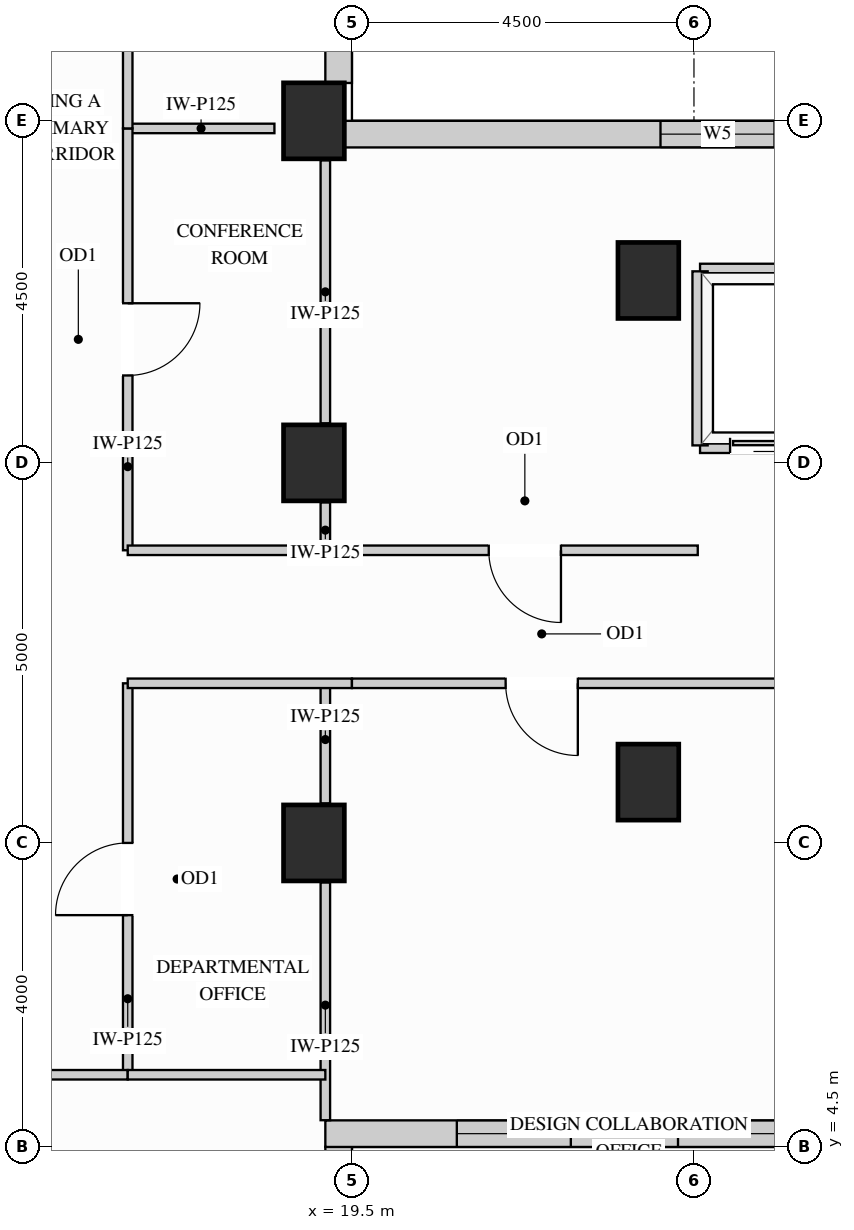
"""IFC4 building model, lengths in metres.
Left out: names, types, materials, properties, quantities, classifications, styles, units other than length and angle.
Written with IfcOpenShell. Run it as: python <this file> out.ifc"""

import sys

from ifc_helpers import new_model, si_unit, direction, frame, frame_2d, origin, origin_2d, place, context, subcontext, project, spatial, rectangle, extrude, source, transform, mapped, element, fill, save


model = new_model("IFC4")
c1 = context("Model", 3, precision=1e-05, world=origin(), true_north=direction((0.0, 1.0)))
c2 = subcontext(c1, "Body", "Model", "MODEL_VIEW")
j1 = project(units=[si_unit("LENGTHUNIT", "METRE"), si_unit("PLANEANGLEUNIT", "RADIAN")], contexts=[c1])
p1 = place(None, origin())
s1 = spatial("IfcSite", under=j1, at=p1, CompositionType="ELEMENT")
p2 = place(p1, origin())
s2 = spatial("IfcBuilding", under=s1, at=p2, CompositionType="ELEMENT")
p3 = place(p2, frame((0.0, 0.0, 146.7)))
s3 = spatial("IfcBuildingStorey", under=s2, at=p3, CompositionType="ELEMENT", Elevation=146.7)
m1 = source(origin(), c2, "Body", "SweptSolid", [
    extrude(rectangle(XDim=0.8, YDim=1.0, at=origin_2d()), origin(), (0.0, 0.0, 1.0), 3.4),
])
for number, where, z_axis, x_axis in (
    (1, (19.0, 13.5, 0.0), (0.0, 0.0, 1.0), (1.0, 0.0, 0.0)),
    (2, (19.0, 18.0, 0.0), (0.0, 0.0, 1.0), (1.0, 0.0, 0.0)),
    (3, (19.0, 8.5, 0.0), (0.0, 0.0, 1.0), (1.0, 0.0, 0.0)),
    (4, (23.4, 15.9, 0.0), (0.0, 0.0, 1.0), (1.0, 0.0, 0.0)),
    (5, (23.4, 9.3, 0.0), (0.0, 0.0, 1.0), (1.0, 0.0, 0.0)),
):
    element("IfcColumn", number, at=place(p3, frame(where, z_axis=z_axis, x_axis=x_axis)), inside=s3, PredefinedType="COLUMN", context=c2, shape_type="MappedRepresentation", body=[
        mapped(m1, transform((0.0, 0.0, 0.0), x_axis=(1.0, 0.0, 0.0), y_axis=(0.0, 1.0, 0.0), z_axis=(0.0, 0.0, 1.0))),
    ])
m2 = source(origin(), c2, "Body", "SweptSolid", [
    extrude(rectangle(XDim=0.504, YDim=0.35, at=frame_2d((0.252, 0.0))), origin(), (0.0, 0.0, 1.0), 2.773),
])
p4 = place(p3, frame((19.325, 3.998, 0.0), z_axis=(0.0, 0.0, 1.0), x_axis=(0.0, 1.0, 0.0)))
e6 = element("IfcWall", 6, at=p4, inside=s3, PredefinedType="SOLIDWALL", context=c2, shape_type="MappedRepresentation", body=[
    mapped(m2, transform((0.0, 0.0, 0.0), x_axis=(1.0, 0.0, 0.0), y_axis=(0.0, 1.0, 0.0), z_axis=(0.0, 0.0, 1.0))),
])
p5 = place(p3, frame((19.15, 4.675, 0.0), z_axis=(0.0, 0.0, 1.0), x_axis=(1.0, 0.0, 0.0)))
e7 = element("IfcWall", 7, at=p5, inside=s3, PredefinedType="SOLIDWALL", context=c2, shape_type="SweptSolid", body=[
    extrude(rectangle(XDim=14.98, YDim=0.35, at=frame_2d((7.49, 0.0))), origin(), (0.0, 0.0, 1.0), 3.385),
])
p6 = place(p5, frame((1.73, 0.0, 0.78)))
e8 = element("IfcOpeningElement", 8, at=p6, cuts=e7, PredefinedType="OPENING", context=c2, shape_type="SweptSolid", body=[
    extrude(rectangle(XDim=1.5, YDim=2.0, at=frame_2d((0.75, 1.0))), frame((0.0, 0.185, 0.0), z_axis=(0.0, -1.0, 0.0), x_axis=(1.0, 0.0, 0.0)), (0.0, 0.0, 1.0), 0.37),
])
p7 = place(p5, frame((4.64, 0.0, 0.78)))
e9 = element("IfcOpeningElement", 9, at=p7, cuts=e7, PredefinedType="OPENING", context=c2, shape_type="SweptSolid", body=[
    extrude(rectangle(XDim=1.5, YDim=2.0, at=frame_2d((0.75, 1.0))), frame((0.0, 0.185, 0.0), z_axis=(0.0, -1.0, 0.0), x_axis=(1.0, 0.0, 0.0)), (0.0, 0.0, 1.0), 0.37),
])
p8 = place(p5, frame((9.253, 0.0, 0.78)))
e10 = element("IfcOpeningElement", 10, at=p8, cuts=e7, PredefinedType="OPENING", context=c2, shape_type="SweptSolid", body=[
    extrude(rectangle(XDim=1.5, YDim=2.0, at=frame_2d((0.75, 1.0))), frame((0.0, 0.185, 0.0), z_axis=(0.0, -1.0, 0.0), x_axis=(1.0, 0.0, 0.0)), (0.0, 0.0, 1.0), 0.37),
])
p9 = place(p5, frame((11.957, 0.0, 0.78)))
e11 = element("IfcOpeningElement", 11, at=p9, cuts=e7, PredefinedType="OPENING", context=c2, shape_type="SweptSolid", body=[
    extrude(rectangle(XDim=1.5, YDim=2.0, at=frame_2d((0.75, 1.0))), frame((0.0, 0.185, 0.0), z_axis=(0.0, -1.0, 0.0), x_axis=(1.0, 0.0, 0.0)), (0.0, 0.0, 1.0), 0.37),
])
p10 = place(p3, frame((34.502, 17.825, 0.0), z_axis=(0.0, 0.0, 1.0), x_axis=(-1.0, 0.0, 0.0)))
e12 = element("IfcWall", 12, at=p10, inside=s3, PredefinedType="SOLIDWALL", context=c2, shape_type="SweptSolid", body=[
    extrude(rectangle(XDim=15.104, YDim=0.35, at=frame_2d((7.552, 0.0))), origin(), (0.0, 0.0, 1.0), 3.385),
])
p11 = place(p10, frame((4.131, 0.0, 0.78)))
e13 = element("IfcOpeningElement", 13, at=p11, cuts=e12, PredefinedType="OPENING", context=c2, shape_type="SweptSolid", body=[
    extrude(rectangle(XDim=1.5, YDim=2.0, at=frame_2d((0.75, 1.0))), frame((0.0, 0.185, 0.0), z_axis=(0.0, -1.0, 0.0), x_axis=(1.0, 0.0, 0.0)), (0.0, 0.0, 1.0), 0.37),
])
p12 = place(p10, frame((9.442, 0.0, 0.78)))
e14 = element("IfcOpeningElement", 14, at=p12, cuts=e12, PredefinedType="OPENING", context=c2, shape_type="SweptSolid", body=[
    extrude(rectangle(XDim=1.5, YDim=2.0, at=frame_2d((0.75, 1.0))), frame((0.0, 0.185, 0.0), z_axis=(0.0, -1.0, 0.0), x_axis=(1.0, 0.0, 0.0)), (0.0, 0.0, 1.0), 0.37),
])
p13 = place(p3, frame((19.325, 18.498, 0.0), z_axis=(0.0, 0.0, 1.0), x_axis=(0.0, 1.0, 0.0)))
e15 = element("IfcWall", 15, at=p13, inside=s3, PredefinedType="SOLIDWALL", context=c2, shape_type="SweptSolid", body=[
    extrude(rectangle(XDim=3.504, YDim=0.35, at=frame_2d((1.752, 0.0))), origin(), (0.0, 0.0, 1.0), 2.612),
])
p14 = place(p13, frame((0.433, 0.0, 0.78)))
e16 = element("IfcOpeningElement", 16, at=p14, cuts=e15, PredefinedType="OPENING", context=c2, shape_type="SweptSolid", body=[
    extrude(rectangle(XDim=1.2, YDim=1.652, at=frame_2d((0.6, 0.826))), frame((0.0, 0.185, 0.0), z_axis=(0.0, -1.0, 0.0), x_axis=(1.0, 0.0, 0.0)), (0.0, 0.0, 1.0), 0.37),
])
m3 = source(origin(), c2, "Body", "SweptSolid", [
    extrude(rectangle(XDim=1.93, YDim=0.125, at=frame_2d((0.965, 0.0))), origin(), (0.0, 0.0, 1.0), 2.773),
])
p15 = place(p3, frame((16.55, 17.9, 0.0), z_axis=(0.0, 0.0, 1.0), x_axis=(1.0, 0.0, 0.0)))
e17 = element("IfcWall", 17, at=p15, inside=s3, PredefinedType="PARTITIONING", context=c2, shape_type="MappedRepresentation", body=[
    mapped(m3, transform((0.0, 0.0, 0.0), x_axis=(1.0, 0.0, 0.0), y_axis=(0.0, 1.0, 0.0), z_axis=(0.0, 0.0, 1.0))),
])
m4 = source(origin(), c2, "Body", "SweptSolid", [
    extrude(rectangle(XDim=0.63, YDim=0.125, at=frame_2d((0.315, 0.0))), origin(), (0.0, 0.0, 1.0), 2.773),
])
p16 = place(p3, frame((19.15, 12.35, 0.0), z_axis=(0.0, 0.0, 1.0), x_axis=(0.0, 1.0, 0.0)))
e18 = element("IfcWall", 18, at=p16, inside=s3, PredefinedType="PARTITIONING", context=c2, shape_type="MappedRepresentation", body=[
    mapped(m4, transform((0.0, 0.0, 0.0), x_axis=(1.0, 0.0, 0.0), y_axis=(0.0, 1.0, 0.0), z_axis=(0.0, 0.0, 1.0))),
])
m5 = source(origin(), c2, "Body", "SweptSolid", [
    extrude(rectangle(XDim=3.46, YDim=0.125, at=frame_2d((1.73, 0.0))), origin(), (0.0, 0.0, 1.0), 2.773),
])
p17 = place(p3, frame((19.15, 14.02, 0.0), z_axis=(0.0, 0.0, 1.0), x_axis=(0.0, 1.0, 0.0)))
e19 = element("IfcWall", 19, at=p17, inside=s3, PredefinedType="PARTITIONING", context=c2, shape_type="MappedRepresentation", body=[
    mapped(m5, transform((0.0, 0.0, 0.0), x_axis=(1.0, 0.0, 0.0), y_axis=(0.0, 1.0, 0.0), z_axis=(0.0, 0.0, 1.0))),
])
m6 = source(origin(), c2, "Body", "SweptSolid", [
    extrude(rectangle(XDim=3.128, YDim=0.125, at=frame_2d((1.564, 0.0))), origin(), (0.0, 0.0, 1.0), 2.773),
])
p18 = place(p3, frame((19.15, 4.852, 0.0), z_axis=(0.0, 0.0, 1.0), x_axis=(0.0, 1.0, 0.0)))
e20 = element("IfcWall", 20, at=p18, inside=s3, PredefinedType="PARTITIONING", context=c2, shape_type="MappedRepresentation", body=[
    mapped(m6, transform((0.0, 0.0, 0.0), x_axis=(1.0, 0.0, 0.0), y_axis=(0.0, 1.0, 0.0), z_axis=(0.0, 0.0, 1.0))),
])
m7 = source(origin(), c2, "Body", "SweptSolid", [
    extrude(rectangle(XDim=1.58, YDim=0.125, at=frame_2d((0.79, 0.0))), origin(), (0.0, 0.0, 1.0), 2.773),
])
p19 = place(p3, frame((19.15, 9.02, 0.0), z_axis=(0.0, 0.0, 1.0), x_axis=(0.0, 1.0, 0.0)))
e21 = element("IfcWall", 21, at=p19, inside=s3, PredefinedType="PARTITIONING", context=c2, shape_type="MappedRepresentation", body=[
    mapped(m7, transform((0.0, 0.0, 0.0), x_axis=(1.0, 0.0, 0.0), y_axis=(0.0, 1.0, 0.0), z_axis=(0.0, 0.0, 1.0))),
])
p20 = place(p3, frame((16.55, 12.35, 0.0), z_axis=(0.0, 0.0, 1.0), x_axis=(0.0, 1.0, 0.0)))
e22 = element("IfcWall", 22, at=p20, inside=s3, PredefinedType="PARTITIONING", context=c2, shape_type="SweptSolid", body=[
    extrude(rectangle(XDim=5.55, YDim=0.125, at=frame_2d((2.775, 0.0))), origin(), (0.0, 0.0, 1.0), 3.385),
])
p21 = place(p20, frame((2.3, 0.0, 0.0)))
e23 = element("IfcOpeningElement", 23, at=p21, cuts=e22, PredefinedType="OPENING", context=c2, shape_type="SweptSolid", body=[
    extrude(rectangle(XDim=0.95, YDim=2.15, at=frame_2d((0.475, 1.075))), frame((0.0, 0.073, 0.0), z_axis=(0.0, -1.0, 0.0), x_axis=(1.0, 0.0, 0.0)), (0.0, 0.0, 1.0), 0.145),
])
p22 = place(p3, frame((16.55, 17.9, 0.0), z_axis=(0.0, 0.0, 1.0), x_axis=(0.0, 1.0, 0.0)))
e24 = element("IfcWall", 24, at=p22, inside=s3, PredefinedType="PARTITIONING", context=c2, shape_type="SweptSolid", body=[
    extrude(rectangle(XDim=5.45, YDim=0.125, at=frame_2d((2.725, 0.0))), origin(), (0.0, 0.0, 1.0), 3.385),
])
p23 = place(p22, frame((2.25, 0.0, 0.0)))
e25 = element("IfcOpeningElement", 25, at=p23, cuts=e24, PredefinedType="OPENING", context=c2, shape_type="SweptSolid", body=[
    extrude(rectangle(XDim=0.95, YDim=2.15, at=frame_2d((0.475, 1.075))), frame((0.0, 0.073, 0.0), z_axis=(0.0, -1.0, 0.0), x_axis=(1.0, 0.0, 0.0)), (0.0, 0.0, 1.0), 0.145),
])
p24 = place(p3, frame((16.55, 5.45, 0.0), z_axis=(0.0, 0.0, 1.0), x_axis=(0.0, 1.0, 0.0)))
e26 = element("IfcWall", 26, at=p24, inside=s3, PredefinedType="PARTITIONING", context=c2, shape_type="SweptSolid", body=[
    extrude(rectangle(XDim=5.15, YDim=0.125, at=frame_2d((2.575, 0.0))), origin(), (0.0, 0.0, 1.0), 3.385),
])
p25 = place(p24, frame((2.1, 0.0, 0.0)))
e27 = element("IfcOpeningElement", 27, at=p25, cuts=e26, PredefinedType="OPENING", context=c2, shape_type="SweptSolid", body=[
    extrude(rectangle(XDim=0.95, YDim=2.15, at=frame_2d((0.475, 1.075))), frame((0.0, 0.073, 0.0), z_axis=(0.0, -1.0, 0.0), x_axis=(1.0, 0.0, 0.0)), (0.0, 0.0, 1.0), 0.145),
])
m8 = source(origin(), c2, "Body", "SweptSolid", [
    extrude(rectangle(XDim=2.95, YDim=0.125, at=frame_2d((1.475, 0.0))), origin(), (0.0, 0.0, 1.0), 3.385),
])
p26 = place(p3, frame((16.55, 12.35, 0.0), z_axis=(0.0, 0.0, 1.0), x_axis=(1.0, 0.0, 0.0)))
e28 = element("IfcWall", 28, at=p26, inside=s3, PredefinedType="PARTITIONING", context=c2, shape_type="MappedRepresentation", body=[
    mapped(m8, transform((0.0, 0.0, 0.0), x_axis=(1.0, 0.0, 0.0), y_axis=(0.0, 1.0, 0.0), z_axis=(0.0, 0.0, 1.0))),
])
p27 = place(p3, frame((19.5, 12.35, 0.0), z_axis=(0.0, 0.0, 1.0), x_axis=(1.0, 0.0, 0.0)))
e29 = element("IfcWall", 29, at=p27, inside=s3, PredefinedType="PARTITIONING", context=c2, shape_type="SweptSolid", body=[
    extrude(rectangle(XDim=4.55, YDim=0.125, at=frame_2d((2.275, 0.0))), origin(), (0.0, 0.0, 1.0), 3.385),
])
p28 = place(p27, frame((1.8, 0.0, 0.0)))
e30 = element("IfcOpeningElement", 30, at=p28, cuts=e29, PredefinedType="OPENING", context=c2, shape_type="SweptSolid", body=[
    extrude(rectangle(XDim=0.95, YDim=2.15, at=frame_2d((0.475, 1.075))), frame((0.0, 0.073, 0.0), z_axis=(0.0, -1.0, 0.0), x_axis=(1.0, 0.0, 0.0)), (0.0, 0.0, 1.0), 0.145),
])
p29 = place(p3, frame((16.55, 10.6, 0.0), z_axis=(0.0, 0.0, 1.0), x_axis=(1.0, 0.0, 0.0)))
e31 = element("IfcWall", 31, at=p29, inside=s3, PredefinedType="PARTITIONING", context=c2, shape_type="MappedRepresentation", body=[
    mapped(m8, transform((0.0, 0.0, 0.0), x_axis=(1.0, 0.0, 0.0), y_axis=(0.0, 1.0, 0.0), z_axis=(0.0, 0.0, 1.0))),
])
p30 = place(p3, frame((19.5, 10.6, 0.0), z_axis=(0.0, 0.0, 1.0), x_axis=(1.0, 0.0, 0.0)))
e32 = element("IfcWall", 32, at=p30, inside=s3, PredefinedType="PARTITIONING", context=c2, shape_type="SweptSolid", body=[
    extrude(rectangle(XDim=7.45, YDim=0.125, at=frame_2d((3.725, 0.0))), origin(), (0.0, 0.0, 1.0), 3.385),
])
p31 = place(p30, frame((2.022, 0.0, 0.0)))
e33 = element("IfcOpeningElement", 33, at=p31, cuts=e32, PredefinedType="OPENING", context=c2, shape_type="SweptSolid", body=[
    extrude(rectangle(XDim=0.95, YDim=2.15, at=frame_2d((0.475, 1.075))), frame((0.0, 0.073, 0.0), z_axis=(0.0, -1.0, 0.0), x_axis=(1.0, 0.0, 0.0)), (0.0, 0.0, 1.0), 0.145),
])
p32 = place(p3, frame((2.45, 5.45, 0.0), z_axis=(0.0, 0.0, 1.0), x_axis=(1.0, 0.0, 0.0)))
e34 = element("IfcWall", 34, at=p32, inside=s3, PredefinedType="PARTITIONING", context=c2, shape_type="SweptSolid", body=[
    extrude(rectangle(XDim=14.1, YDim=0.125, at=frame_2d((7.05, 0.0))), origin(), (0.0, 0.0, 1.0), 3.385),
])
p33 = place(p32, frame((6.575, 0.0, 0.0)))
e35 = element("IfcOpeningElement", 35, at=p33, cuts=e34, PredefinedType="OPENING", context=c2, shape_type="SweptSolid", body=[
    extrude(rectangle(XDim=0.95, YDim=2.15, at=frame_2d((0.475, 1.075))), frame((0.0, 0.073, 0.0), z_axis=(0.0, -1.0, 0.0), x_axis=(1.0, 0.0, 0.0)), (0.0, 0.0, 1.0), 0.145),
])
m9 = source(origin(), c2, "Body", "SweptSolid", [
    extrude(rectangle(XDim=2.6, YDim=0.125, at=frame_2d((1.3, 0.0))), origin(), (0.0, 0.0, 1.0), 3.385),
])
p34 = place(p3, frame((16.55, 5.45, 0.0), z_axis=(0.0, 0.0, 1.0), x_axis=(1.0, 0.0, 0.0)))
e36 = element("IfcWall", 36, at=p34, inside=s3, PredefinedType="PARTITIONING", context=c2, shape_type="MappedRepresentation", body=[
    mapped(m9, transform((0.0, 0.0, 0.0), x_axis=(1.0, 0.0, 0.0), y_axis=(0.0, 1.0, 0.0), z_axis=(0.0, 0.0, 1.0))),
])
m10 = source(origin(), c2, "Body", "SweptSolid", [
    extrude(rectangle(XDim=1.89, YDim=0.2, at=frame_2d((0.945, 0.0))), origin(), (0.0, 0.0, 1.0), 2.773),
])
p35 = place(p3, frame((24.08, 16.02, 0.0), z_axis=(0.0, 0.0, 1.0), x_axis=(1.0, 0.0, 0.0)))
e37 = element("IfcWall", 37, at=p35, inside=s3, PredefinedType="PARTITIONING", context=c2, shape_type="MappedRepresentation", body=[
    mapped(m10, transform((0.0, 0.0, 0.0), x_axis=(1.0, 0.0, 0.0), y_axis=(0.0, 1.0, 0.0), z_axis=(0.0, 0.0, 1.0))),
])
p36 = place(p3, frame((24.08, 13.73, 0.0), z_axis=(0.0, 0.0, 1.0), x_axis=(1.0, 0.0, 0.0)))
e38 = element("IfcWall", 38, at=p36, inside=s3, PredefinedType="PARTITIONING", context=c2, shape_type="SweptSolid", body=[
    extrude(rectangle(XDim=1.89, YDim=0.2, at=frame_2d((0.945, 0.0))), origin(), (0.0, 0.0, 1.0), 2.466),
])
p37 = place(p36, frame((0.395, 0.0, 0.0)))
e39 = element("IfcOpeningElement", 39, at=p37, cuts=e38, PredefinedType="OPENING", context=c2, shape_type="SweptSolid", body=[
    extrude(rectangle(XDim=1.1, YDim=2.2, at=frame_2d((0.55, 1.1))), frame((0.0, 0.11, 0.0), z_axis=(0.0, -1.0, 0.0), x_axis=(1.0, 0.0, 0.0)), (0.0, 0.0, 1.0), 0.22),
])
m11 = source(origin(), c2, "Body", "SweptSolid", [
    extrude(rectangle(XDim=2.29, YDim=0.2, at=frame_2d((1.145, 0.0))), origin(), (0.0, 0.0, 1.0), 3.385),
])
p38 = place(p3, frame((24.08, 13.73, 0.0), z_axis=(0.0, 0.0, 1.0), x_axis=(0.0, 1.0, 0.0)))
e40 = element("IfcWall", 40, at=p38, inside=s3, PredefinedType="PARTITIONING", context=c2, shape_type="MappedRepresentation", body=[
    mapped(m11, transform((0.0, 0.0, 0.0), x_axis=(1.0, 0.0, 0.0), y_axis=(0.0, 1.0, 0.0), z_axis=(0.0, 0.0, 1.0))),
])
m12 = source(origin(), c2, "Body", "SweptSolid", [
    extrude(rectangle(XDim=1.1, YDim=2.2, at=frame_2d((0.55, 1.1))), frame((0.0, 0.025, 0.0), z_axis=(0.0, -1.0, 0.0), x_axis=(1.0, 0.0, 0.0)), (0.0, 0.0, 1.0), 0.05),
])
p39 = place(p37, origin())
e41 = element("IfcDoor", 41, at=p39, inside=s3, OperationType="SLIDING_TO_LEFT", PredefinedType="DOOR", context=c2, shape_type="MappedRepresentation", body=[
    mapped(m12, transform((0.0, 0.0, 0.0), x_axis=(1.0, 0.0, 0.0), y_axis=(0.0, 1.0, 0.0), z_axis=(0.0, 0.0, 1.0))),
])
fill(e39, e41)
m13 = source(origin(), c2, "Body", "SweptSolid", [
    extrude(rectangle(XDim=0.95, YDim=2.15, at=frame_2d((0.475, 1.075))), frame((0.0, 0.025, 0.0), z_axis=(0.0, -1.0, 0.0), x_axis=(1.0, 0.0, 0.0)), (0.0, 0.0, 1.0), 0.05),
])
p40 = place(p25, origin())
e42 = element("IfcDoor", 42, at=p40, inside=s3, OperationType="SINGLE_SWING_LEFT", PredefinedType="DOOR", context=c2, shape_type="MappedRepresentation", body=[
    mapped(m13, transform((0.0, 0.0, 0.0), x_axis=(1.0, 0.0, 0.0), y_axis=(0.0, 1.0, 0.0), z_axis=(0.0, 0.0, 1.0))),
])
fill(e27, e42)
p41 = place(p21, origin())
e43 = element("IfcDoor", 43, at=p41, inside=s3, OperationType="SINGLE_SWING_RIGHT", PredefinedType="DOOR", context=c2, shape_type="MappedRepresentation", body=[
    mapped(m13, transform((0.0, 0.0, 0.0), x_axis=(1.0, 0.0, 0.0), y_axis=(0.0, 1.0, 0.0), z_axis=(0.0, 0.0, 1.0))),
])
fill(e23, e43)
p42 = place(p28, origin())
e44 = element("IfcDoor", 44, at=p42, inside=s3, OperationType="SINGLE_SWING_RIGHT", PredefinedType="DOOR", context=c2, shape_type="MappedRepresentation", body=[
    mapped(m13, transform((0.0, 0.0, 0.0), x_axis=(1.0, 0.0, 0.0), y_axis=(0.0, 1.0, 0.0), z_axis=(0.0, 0.0, 1.0))),
])
fill(e30, e44)
p43 = place(p31, origin())
e45 = element("IfcDoor", 45, at=p43, inside=s3, OperationType="SINGLE_SWING_RIGHT", PredefinedType="DOOR", context=c2, shape_type="MappedRepresentation", body=[
    mapped(m13, transform((0.0, 0.0, 0.0), x_axis=(1.0, 0.0, 0.0), y_axis=(0.0, 1.0, 0.0), z_axis=(0.0, 0.0, 1.0))),
])
fill(e33, e45)
m14 = source(origin(), c2, "Body", "SweptSolid", [
    extrude(rectangle(XDim=1.5, YDim=2.0, at=frame_2d((0.75, 1.0))), frame((0.0, 0.03, 0.0), z_axis=(0.0, -1.0, 0.0), x_axis=(1.0, 0.0, 0.0)), (0.0, 0.0, 1.0), 0.06),
])
p44 = place(p6, origin())
e46 = element("IfcWindow", 46, at=p44, inside=s3, PartitioningType="SINGLE_PANEL", PredefinedType="WINDOW", context=c2, shape_type="MappedRepresentation", body=[
    mapped(m14, transform((0.0, 0.0, 0.0), x_axis=(1.0, 0.0, 0.0), y_axis=(0.0, 1.0, 0.0), z_axis=(0.0, 0.0, 1.0))),
])
fill(e8, e46)
p45 = place(p7, origin())
e47 = element("IfcWindow", 47, at=p45, inside=s3, PartitioningType="SINGLE_PANEL", PredefinedType="WINDOW", context=c2, shape_type="MappedRepresentation", body=[
    mapped(m14, transform((0.0, 0.0, 0.0), x_axis=(1.0, 0.0, 0.0), y_axis=(0.0, 1.0, 0.0), z_axis=(0.0, 0.0, 1.0))),
])
fill(e9, e47)
p46 = place(p12, origin())
e48 = element("IfcWindow", 48, at=p46, inside=s3, PartitioningType="SINGLE_PANEL", PredefinedType="WINDOW", context=c2, shape_type="MappedRepresentation", body=[
    mapped(m14, transform((0.0, 0.0, 0.0), x_axis=(1.0, 0.0, 0.0), y_axis=(0.0, 1.0, 0.0), z_axis=(0.0, 0.0, 1.0))),
])
fill(e14, e48)
save(model, sys.argv[1])
